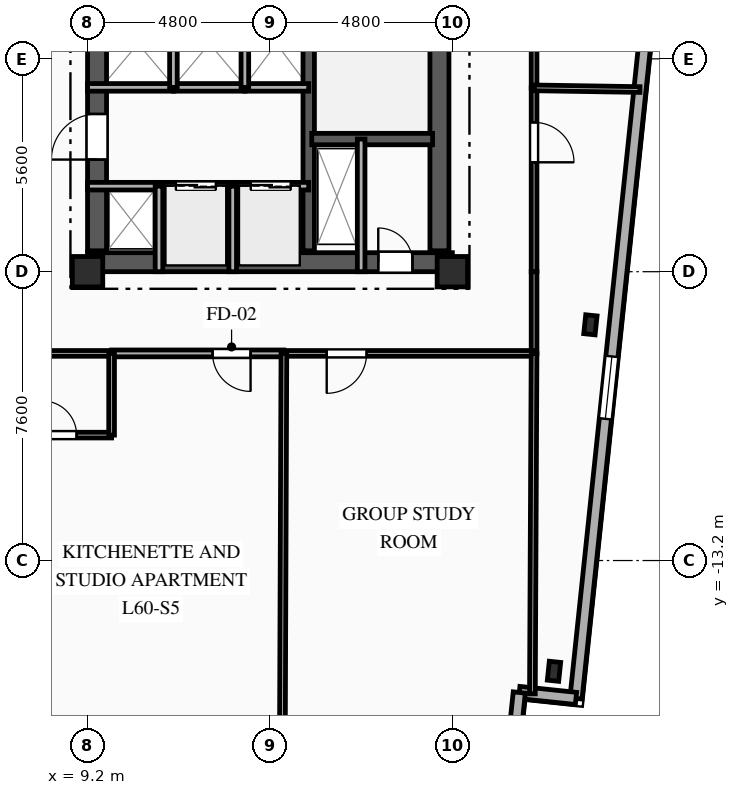
"""IFC4 building model, lengths in metres.
Left out: names, types, materials, properties, quantities, classifications, styles, units other than length and angle.
Written with IfcOpenShell. Run it as: python <this file> out.ifc"""

import sys

from ifc_helpers import new_model, si_unit, direction, frame, frame_2d, origin, origin_2d, place, context, subcontext, project, spatial, rectangle, i_section, extrude, element, fill, save


model = new_model("IFC4")
c1 = context("Model", 3, precision=1e-05, world=origin(), true_north=direction((0.0, 1.0)))
c2 = subcontext(c1, "Body", "Model", "MODEL_VIEW")
j1 = project(units=[si_unit("LENGTHUNIT", "METRE"), si_unit("PLANEANGLEUNIT", "RADIAN")], contexts=[c1])
p1 = place(None, origin())
s1 = spatial("IfcSite", under=j1, at=p1, CompositionType="ELEMENT")
p2 = place(p1, origin())
s2 = spatial("IfcBuilding", under=s1, at=p2, CompositionType="ELEMENT")
p3 = place(p2, frame((0.0, 0.0, 213.15)))
s3 = spatial("IfcBuildingStorey", under=s2, at=p3, CompositionType="ELEMENT", Elevation=213.15)
for number, where, z_axis, x_axis in (
    (1, (9.2, -5.6, 0.0), (0.0, 0.0, 1.0), (1.0, 0.0, 0.0)),
    (2, (18.8, -5.6, 0.0), (0.0, 0.0, 1.0), (1.0, 0.0, 0.0)),
):
    element("IfcColumn", number, at=place(p3, frame(where, z_axis=z_axis, x_axis=x_axis)), inside=s3, PredefinedType="COLUMN", context=c2, shape_type="SweptSolid", body=[
        extrude(rectangle(XDim=0.8, YDim=0.8, at=origin_2d()), origin(), (0.0, 0.0, 1.0), 3.35),
    ])
for number, where, z_axis, x_axis in (
    (3, (21.474, -16.114, 0.0), (0.0, 0.0, 1.0), (0.995, -0.105, 0.0)),
    (4, (22.433, -6.998, 0.0), (0.0, 0.0, 1.0), (0.995, -0.105, 0.0)),
):
    element("IfcColumn", number, at=place(p3, frame(where, z_axis=z_axis, x_axis=x_axis)), inside=s3, PredefinedType="COLUMN", context=c2, shape_type="SweptSolid", body=[
        extrude(i_section(OverallWidth=0.3, OverallDepth=0.5, WebThickness=0.014, FlangeThickness=0.028, FilletRadius=0.027, at=origin_2d()), origin(), (0.0, 0.0, 1.0), 3.35),
    ])
p4 = place(p3, frame((25.063, 11.814, 0.0), z_axis=(0.0, 0.0, 1.0), x_axis=(-0.104523275986, -0.99452244056, 0.0)))
e5 = element("IfcWall", 5, at=p4, inside=s3, PredefinedType="SOLIDWALL", context=c2, shape_type="SweptSolid", body=[
    extrude(rectangle(XDim=28.8, YDim=0.32, at=frame_2d((14.4, 0.0))), origin(), (0.0, 0.0, 1.0), 3.04),
])
p5 = place(p4, frame((5.793, 0.0, 0.85)))
e6 = element("IfcOpeningElement", 6, at=p5, cuts=e5, PredefinedType="OPENING", context=c2, shape_type="SweptSolid", body=[
    extrude(rectangle(XDim=1.65, YDim=1.85, at=frame_2d((0.825, 0.925))), frame((0.0, 0.17, 0.0), z_axis=(0.0, -1.0, 0.0), x_axis=(1.0, 0.0, 0.0)), (0.0, 0.0, 1.0), 0.34),
])
p6 = place(p4, frame((19.752, 0.0, 0.85)))
e7 = element("IfcOpeningElement", 7, at=p6, cuts=e5, PredefinedType="OPENING", context=c2, shape_type="SweptSolid", body=[
    extrude(rectangle(XDim=1.65, YDim=1.85, at=frame_2d((0.825, 0.925))), frame((0.0, 0.17, 0.0), z_axis=(0.0, -1.0, 0.0), x_axis=(1.0, 0.0, 0.0)), (0.0, 0.0, 1.0), 0.34),
])
p7 = place(p3, frame((22.053, -16.828, 0.0), z_axis=(0.0, 0.0, 1.0), x_axis=(-0.994526834051, 0.104481464157, 0.0)))
e8 = element("IfcWall", 8, at=p7, inside=s3, PredefinedType="SOLIDWALL", context=c2, shape_type="SweptSolid", body=[
    extrude(rectangle(XDim=1.5, YDim=0.32, at=frame_2d((0.75, 0.0))), origin(), (0.0, 0.0, 1.0), 3.04),
])
p8 = place(p3, frame((20.561, -16.672, 0.0), z_axis=(0.0, 0.0, 1.0), x_axis=(-0.104498377516, -0.994525057048, 0.0)))
e9 = element("IfcWall", 9, at=p8, inside=s3, PredefinedType="SOLIDWALL", context=c2, shape_type="SweptSolid", body=[
    extrude(rectangle(XDim=1.5, YDim=0.32, at=frame_2d((0.75, 0.0))), origin(), (0.0, 0.0, 1.0), 3.04),
])
p9 = place(p3, frame((18.756, -19.498, 0.0), z_axis=(0.0, 0.0, 1.0), x_axis=(-0.994522060044, 0.104526896475, 0.0)))
e10 = element("IfcWall", 10, at=p9, inside=s3, PredefinedType="SOLIDWALL", context=c2, shape_type="SweptSolid", body=[
    extrude(rectangle(XDim=45.8, YDim=0.32, at=frame_2d((22.9, 0.0))), origin(), (0.0, 0.0, 1.0), 3.04),
])
p10 = place(p9, frame((1.657, 0.0, 0.85)))
e11 = element("IfcOpeningElement", 11, at=p10, cuts=e10, PredefinedType="OPENING", context=c2, shape_type="SweptSolid", body=[
    extrude(rectangle(XDim=1.65, YDim=1.85, at=frame_2d((0.825, 0.925))), frame((0.0, 0.17, 0.0), z_axis=(0.0, -1.0, 0.0), x_axis=(1.0, 0.0, 0.0)), (0.0, 0.0, 1.0), 0.34),
])
p11 = place(p9, frame((6.907, 0.0, 0.85)))
e12 = element("IfcOpeningElement", 12, at=p11, cuts=e10, PredefinedType="OPENING", context=c2, shape_type="SweptSolid", body=[
    extrude(rectangle(XDim=2.2, YDim=1.85, at=frame_2d((1.1, 0.925))), frame((0.0, 0.17, 0.0), z_axis=(0.0, -1.0, 0.0), x_axis=(1.0, 0.0, 0.0)), (0.0, 0.0, 1.0), 0.34),
])
p12 = place(p9, frame((13.953, 0.0, 0.85)))
e13 = element("IfcOpeningElement", 13, at=p12, cuts=e10, PredefinedType="OPENING", context=c2, shape_type="SweptSolid", body=[
    extrude(rectangle(XDim=2.2, YDim=1.85, at=frame_2d((1.1, 0.925))), frame((0.0, 0.17, 0.0), z_axis=(0.0, -1.0, 0.0), x_axis=(1.0, 0.0, 0.0)), (0.0, 0.0, 1.0), 0.34),
])
p13 = place(p9, frame((20.959, 0.0, 0.85)))
e14 = element("IfcOpeningElement", 14, at=p13, cuts=e10, PredefinedType="OPENING", context=c2, shape_type="SweptSolid", body=[
    extrude(rectangle(XDim=2.2, YDim=1.85, at=frame_2d((1.1, 0.925))), frame((0.0, 0.17, 0.0), z_axis=(0.0, -1.0, 0.0), x_axis=(1.0, 0.0, 0.0)), (0.0, 0.0, 1.0), 0.34),
])
p14 = place(p9, frame((27.965, 0.0, 0.85)))
e15 = element("IfcOpeningElement", 15, at=p14, cuts=e10, PredefinedType="OPENING", context=c2, shape_type="SweptSolid", body=[
    extrude(rectangle(XDim=2.2, YDim=1.85, at=frame_2d((1.1, 0.925))), frame((0.0, 0.17, 0.0), z_axis=(0.0, -1.0, 0.0), x_axis=(1.0, 0.0, 0.0)), (0.0, 0.0, 1.0), 0.34),
])
p15 = place(p9, frame((35.487, 0.0, 0.85)))
e16 = element("IfcOpeningElement", 16, at=p15, cuts=e10, PredefinedType="OPENING", context=c2, shape_type="SweptSolid", body=[
    extrude(rectangle(XDim=1.65, YDim=1.85, at=frame_2d((0.825, 0.925))), frame((0.0, 0.17, 0.0), z_axis=(0.0, -1.0, 0.0), x_axis=(1.0, 0.0, 0.0)), (0.0, 0.0, 1.0), 0.34),
])
p16 = place(p9, frame((41.212, 0.0, 0.85)))
e17 = element("IfcOpeningElement", 17, at=p16, cuts=e10, PredefinedType="OPENING", context=c2, shape_type="SweptSolid", body=[
    extrude(rectangle(XDim=1.65, YDim=1.85, at=frame_2d((0.825, 0.925))), frame((0.0, 0.17, 0.0), z_axis=(0.0, -1.0, 0.0), x_axis=(1.0, 0.0, 0.0)), (0.0, 0.0, 1.0), 0.34),
])
p17 = place(p3, frame((9.2, -5.35, 0.0), z_axis=(0.0, 0.0, 1.0), x_axis=(1.0, 0.0, 0.0)))
e18 = element("IfcWall", 18, at=p17, inside=s3, PredefinedType="SHEAR", context=c2, shape_type="SweptSolid", body=[
    extrude(rectangle(XDim=9.6, YDim=0.5, at=frame_2d((4.8, 0.0))), origin(), (0.0, 0.0, 1.0), 3.04),
])
p18 = place(p17, frame((7.65, 0.0, 0.0)))
e19 = element("IfcOpeningElement", 19, at=p18, cuts=e18, PredefinedType="OPENING", context=c2, shape_type="SweptSolid", body=[
    extrude(rectangle(XDim=0.9, YDim=2.1, at=frame_2d((0.45, 1.05))), frame((0.0, 0.26, 0.0), z_axis=(0.0, -1.0, 0.0), x_axis=(1.0, 0.0, 0.0)), (0.0, 0.0, 1.0), 0.52),
])
p19 = place(p3, frame((9.45, -5.05, 0.0), z_axis=(0.0, 0.0, 1.0), x_axis=(0.0, 1.0, 0.0)))
e20 = element("IfcWall", 20, at=p19, inside=s3, PredefinedType="SHEAR", context=c2, shape_type="SweptSolid", body=[
    extrude(rectangle(XDim=10.1, YDim=0.5, at=frame_2d((5.05, 0.0))), origin(), (0.0, 0.0, 1.0), 3.04),
])
p20 = place(p19, frame((7.15, 0.0, 0.0)))
e21 = element("IfcOpeningElement", 21, at=p20, cuts=e20, PredefinedType="OPENING", context=c2, shape_type="SweptSolid", body=[
    extrude(rectangle(XDim=0.9, YDim=2.1, at=frame_2d((0.45, 1.05))), frame((0.0, 0.26, 0.0), z_axis=(0.0, -1.0, 0.0), x_axis=(1.0, 0.0, 0.0)), (0.0, 0.0, 1.0), 0.52),
])
p21 = place(p19, frame((2.4, 0.0, 0.0)))
e22 = element("IfcOpeningElement", 22, at=p21, cuts=e20, PredefinedType="OPENING", context=c2, shape_type="SweptSolid", body=[
    extrude(rectangle(XDim=1.2, YDim=2.15, at=frame_2d((0.6, 1.075))), frame((0.0, 0.26, 0.0), z_axis=(0.0, -1.0, 0.0), x_axis=(1.0, 0.0, 0.0)), (0.0, 0.0, 1.0), 0.52),
])
p22 = place(p3, frame((18.46, -5.05, 0.0), z_axis=(0.0, 0.0, 1.0), x_axis=(0.0, 1.0, 0.0)))
e23 = element("IfcWall", 23, at=p22, inside=s3, PredefinedType="SHEAR", context=c2, shape_type="SweptSolid", body=[
    extrude(rectangle(XDim=10.1, YDim=0.5, at=frame_2d((5.05, 0.0))), origin(), (0.0, 0.0, 1.0), 3.04),
])
p23 = place(p3, frame((15.02, -5.05, 0.0), z_axis=(0.0, 0.0, 1.0), x_axis=(0.0, 1.0, 0.0)))
e24 = element("IfcWall", 24, at=p23, inside=s3, PredefinedType="SHEAR", context=c2, shape_type="SweptSolid", body=[
    extrude(rectangle(XDim=10.1, YDim=0.3, at=frame_2d((5.05, 0.0))), origin(), (0.0, 0.0, 1.0), 3.04),
])
p24 = place(p3, frame((15.1, -2.11, 0.0), z_axis=(0.0, 0.0, 1.0), x_axis=(1.0, 0.0, 0.0)))
e25 = element("IfcWall", 25, at=p24, inside=s3, PredefinedType="SHEAR", context=c2, shape_type="SweptSolid", body=[
    extrude(rectangle(XDim=3.18, YDim=0.3, at=frame_2d((1.59, 0.0))), origin(), (0.0, 0.0, 1.0), 3.04),
])
p25 = place(p3, frame((16.4, -2.11, 0.0), z_axis=(0.0, 0.0, 1.0), x_axis=(0.0, -1.0, 0.0)))
e26 = element("IfcWall", 26, at=p25, inside=s3, PredefinedType="PARTITIONING", context=c2, shape_type="SweptSolid", body=[
    extrude(rectangle(XDim=3.49, YDim=0.2, at=frame_2d((1.745, 0.0))), origin(), (0.0, 0.0, 1.0), 3.04),
])
p26 = place(p3, frame((9.2, -3.35, 0.0), z_axis=(0.0, 0.0, 1.0), x_axis=(1.0, 0.0, 0.0)))
e27 = element("IfcWall", 27, at=p26, inside=s3, PredefinedType="PARTITIONING", context=c2, shape_type="SweptSolid", body=[
    extrude(rectangle(XDim=1.88, YDim=0.2, at=frame_2d((0.94, 0.0))), origin(), (0.0, 0.0, 1.0), 2.755),
])
p27 = place(p3, frame((11.08, -3.35, 0.0), z_axis=(0.0, 0.0, 1.0), x_axis=(1.0, 0.0, 0.0)))
e28 = element("IfcWall", 28, at=p27, inside=s3, PredefinedType="PARTITIONING", context=c2, shape_type="SweptSolid", body=[
    extrude(rectangle(XDim=1.94, YDim=0.2, at=frame_2d((0.97, 0.0))), origin(), (0.0, 0.0, 1.0), 3.04),
])
p28 = place(p27, frame((0.445, 0.0, 0.0)))
e29 = element("IfcOpeningElement", 29, at=p28, cuts=e28, PredefinedType="OPENING", context=c2, shape_type="SweptSolid", body=[
    extrude(rectangle(XDim=1.05, YDim=2.1, at=frame_2d((0.525, 1.05))), frame((0.0, 0.11, 0.0), z_axis=(0.0, -1.0, 0.0), x_axis=(1.0, 0.0, 0.0)), (0.0, 0.0, 1.0), 0.22),
])
p29 = place(p3, frame((13.02, -3.35, 0.0), z_axis=(0.0, 0.0, 1.0), x_axis=(1.0, 0.0, 0.0)))
e30 = element("IfcWall", 30, at=p29, inside=s3, PredefinedType="PARTITIONING", context=c2, shape_type="SweptSolid", body=[
    extrude(rectangle(XDim=2.0, YDim=0.2, at=frame_2d((1.0, 0.0))), origin(), (0.0, 0.0, 1.0), 3.04),
])
p30 = place(p29, frame((0.475, 0.0, 0.0)))
e31 = element("IfcOpeningElement", 31, at=p30, cuts=e30, PredefinedType="OPENING", context=c2, shape_type="SweptSolid", body=[
    extrude(rectangle(XDim=1.05, YDim=2.1, at=frame_2d((0.525, 1.05))), frame((0.0, 0.11, 0.0), z_axis=(0.0, -1.0, 0.0), x_axis=(1.0, 0.0, 0.0)), (0.0, 0.0, 1.0), 0.22),
])
p31 = place(p3, frame((11.46, -0.75, 0.0), z_axis=(0.0, 0.0, 1.0), x_axis=(-1.0, 0.0, 0.0)))
e32 = element("IfcWall", 32, at=p31, inside=s3, PredefinedType="PARTITIONING", context=c2, shape_type="SweptSolid", body=[
    extrude(rectangle(XDim=2.26, YDim=0.2, at=frame_2d((1.13, 0.0))), origin(), (0.0, 0.0, 1.0), 3.04),
])
p32 = place(p3, frame((13.34, -0.75, 0.0), z_axis=(0.0, 0.0, 1.0), x_axis=(-1.0, 0.0, 0.0)))
e33 = element("IfcWall", 33, at=p32, inside=s3, PredefinedType="PARTITIONING", context=c2, shape_type="SweptSolid", body=[
    extrude(rectangle(XDim=1.88, YDim=0.2, at=frame_2d((0.94, 0.0))), origin(), (0.0, 0.0, 1.0), 3.04),
])
p33 = place(p3, frame((15.02, -0.75, 0.0), z_axis=(0.0, 0.0, 1.0), x_axis=(-1.0, 0.0, 0.0)))
e34 = element("IfcWall", 34, at=p33, inside=s3, PredefinedType="PARTITIONING", context=c2, shape_type="SweptSolid", body=[
    extrude(rectangle(XDim=1.68, YDim=0.2, at=frame_2d((0.84, 0.0))), origin(), (0.0, 0.0, 1.0), 3.04),
])
for number, where, z_axis, x_axis in (
    (35, (11.08, -5.6, 0.0), (0.0, 0.0, 1.0), (0.0, 1.0, 0.0)),
    (36, (13.02, -5.6, 0.0), (0.0, 0.0, 1.0), (0.0, 1.0, 0.0)),
):
    element("IfcWall", number, at=place(p3, frame(where, z_axis=z_axis, x_axis=x_axis)), inside=s3, PredefinedType="PARTITIONING", context=c2, shape_type="SweptSolid", body=[
        extrude(rectangle(XDim=2.25, YDim=0.2, at=frame_2d((1.125, 0.0))), origin(), (0.0, 0.0, 1.0), 3.04),
    ])
for number, where, z_axis, x_axis in (
    (37, (11.46, -0.75, 0.0), (0.0, 0.0, 1.0), (0.0, 1.0, 0.0)),
    (38, (13.34, -0.75, 0.0), (0.0, 0.0, 1.0), (0.0, 1.0, 0.0)),
):
    element("IfcWall", number, at=place(p3, frame(where, z_axis=z_axis, x_axis=x_axis)), inside=s3, PredefinedType="PARTITIONING", context=c2, shape_type="SweptSolid", body=[
        extrude(rectangle(XDim=2.3, YDim=0.2, at=frame_2d((1.15, 0.0))), origin(), (0.0, 0.0, 1.0), 3.04),
    ])
p34 = place(p3, frame((20.95, -5.6, 0.0), z_axis=(0.0, 0.0, 1.0), x_axis=(0.0, -1.0, 0.0)))
e39 = element("IfcWall", 39, at=p34, inside=s3, PredefinedType="PARTITIONING", context=c2, shape_type="SweptSolid", body=[
    extrude(rectangle(XDim=2.15, YDim=0.15, at=frame_2d((1.075, 0.0))), origin(), (0.0, 0.0, 1.0), 3.04),
])
p35 = place(p3, frame((14.367, -7.75, 0.0), z_axis=(0.0, 0.0, 1.0), x_axis=(-1.0, 0.0, 0.0)))
e40 = element("IfcWall", 40, at=p35, inside=s3, PredefinedType="PARTITIONING", context=c2, shape_type="SweptSolid", body=[
    extrude(rectangle(XDim=4.534, YDim=0.18, at=frame_2d((2.267, 0.0))), origin(), (0.0, 0.0, 1.0), 3.04),
])
p36 = place(p35, frame((0.877, 0.0, 0.0)))
e41 = element("IfcOpeningElement", 41, at=p36, cuts=e40, PredefinedType="OPENING", context=c2, shape_type="SweptSolid", body=[
    extrude(rectangle(XDim=1.0, YDim=2.15, at=frame_2d((0.5, 1.075))), frame((0.0, 0.1, 0.0), z_axis=(0.0, -1.0, 0.0), x_axis=(1.0, 0.0, 0.0)), (0.0, 0.0, 1.0), 0.2),
])
p37 = place(p3, frame((9.833, -7.75, 0.0), z_axis=(0.0, 0.0, 1.0), x_axis=(-1.0, 0.0, 0.0)))
e42 = element("IfcWall", 42, at=p37, inside=s3, PredefinedType="PLUMBINGWALL", context=c2, shape_type="SweptSolid", body=[
    extrude(rectangle(XDim=2.45, YDim=0.15, at=frame_2d((1.225, 0.0))), origin(), (0.0, 0.0, 1.0), 3.04),
])
p38 = place(p3, frame((20.95, -7.75, 0.0), z_axis=(0.0, 0.0, 1.0), x_axis=(-1.0, 0.0, 0.0)))
e43 = element("IfcWall", 43, at=p38, inside=s3, PredefinedType="PARTITIONING", context=c2, shape_type="SweptSolid", body=[
    extrude(rectangle(XDim=6.583, YDim=0.15, at=frame_2d((3.292, 0.0))), origin(), (0.0, 0.0, 1.0), 3.04),
])
p39 = place(p38, frame((4.406, 0.0, 0.0)))
e44 = element("IfcOpeningElement", 44, at=p39, cuts=e43, PredefinedType="OPENING", context=c2, shape_type="SweptSolid", body=[
    extrude(rectangle(XDim=1.05, YDim=2.15, at=frame_2d((0.525, 1.075))), frame((0.0, 0.085, 0.0), z_axis=(0.0, -1.0, 0.0), x_axis=(1.0, 0.0, 0.0)), (0.0, 0.0, 1.0), 0.17),
])
p40 = place(p3, frame((20.95, -0.763, 0.0), z_axis=(0.0, 0.0, 1.0), x_axis=(0.0, -1.0, 0.0)))
e45 = element("IfcWall", 45, at=p40, inside=s3, PredefinedType="PARTITIONING", context=c2, shape_type="SweptSolid", body=[
    extrude(rectangle(XDim=4.837, YDim=0.15, at=frame_2d((2.418, 0.0))), origin(), (0.0, 0.0, 1.0), 2.695),
])
p41 = place(p40, frame((0.908, 0.0, 0.0)))
e46 = element("IfcOpeningElement", 46, at=p41, cuts=e45, PredefinedType="OPENING", context=c2, shape_type="SweptSolid", body=[
    extrude(rectangle(XDim=1.05, YDim=2.15, at=frame_2d((0.525, 1.075))), frame((0.0, 0.085, 0.0), z_axis=(0.0, -1.0, 0.0), x_axis=(1.0, 0.0, 0.0)), (0.0, 0.0, 1.0), 0.17),
])
p42 = place(p3, frame((20.95, 8.5, 0.0), z_axis=(0.0, 0.0, 1.0), x_axis=(0.0, -1.0, 0.0)))
e47 = element("IfcWall", 47, at=p42, inside=s3, PredefinedType="PARTITIONING", context=c2, shape_type="SweptSolid", body=[
    extrude(rectangle(XDim=9.263, YDim=0.15, at=frame_2d((4.632, 0.0))), origin(), (0.0, 0.0, 1.0), 2.695),
])
p43 = place(p42, frame((6.751, 0.0, 0.0)))
e48 = element("IfcOpeningElement", 48, at=p43, cuts=e47, PredefinedType="OPENING", context=c2, shape_type="SweptSolid", body=[
    extrude(rectangle(XDim=1.05, YDim=2.15, at=frame_2d((0.525, 1.075))), frame((0.0, 0.085, 0.0), z_axis=(0.0, -1.0, 0.0), x_axis=(1.0, 0.0, 0.0)), (0.0, 0.0, 1.0), 0.17),
])
p44 = place(p3, frame((20.95, -0.763, 0.0), z_axis=(0.0, 0.0, 1.0), x_axis=(0.999875696831, -0.015766765259, 0.0)))
e49 = element("IfcWall", 49, at=p44, inside=s3, PredefinedType="PARTITIONING", context=c2, shape_type="SweptSolid", body=[
    extrude(rectangle(XDim=2.787, YDim=0.15, at=frame_2d((1.394, 0.0))), origin(), (0.0, 0.0, 1.0), 3.04),
])
p45 = place(p3, frame((20.906, -16.708, 0.0), z_axis=(0.0, 0.0, 1.0), x_axis=(0.004905642486, 0.999987967264, 0.0)))
e50 = element("IfcWall", 50, at=p45, inside=s3, PredefinedType="PARTITIONING", context=c2, shape_type="SweptSolid", body=[
    extrude(rectangle(XDim=8.958, YDim=0.15, at=frame_2d((4.479, 0.0))), origin(), (0.0, 0.0, 1.0), 2.665),
])
p46 = place(p3, frame((7.383, -9.9, 0.0), z_axis=(0.0, 0.0, 1.0), x_axis=(1.0, 0.0, 0.0)))
e51 = element("IfcWall", 51, at=p46, inside=s3, PredefinedType="PLUMBINGWALL", context=c2, shape_type="SweptSolid", body=[
    extrude(rectangle(XDim=2.45, YDim=0.15, at=frame_2d((1.225, 0.0))), origin(), (0.0, 0.0, 1.0), 3.04),
])
p47 = place(p46, frame((0.629, 0.0, 0.0)))
e52 = element("IfcOpeningElement", 52, at=p47, cuts=e51, PredefinedType="OPENING", context=c2, shape_type="SweptSolid", body=[
    extrude(rectangle(XDim=0.9, YDim=2.1, at=frame_2d((0.45, 1.05))), frame((0.0, 0.085, 0.0), z_axis=(0.0, -1.0, 0.0), x_axis=(1.0, 0.0, 0.0)), (0.0, 0.0, 1.0), 0.17),
])
p48 = place(p3, frame((9.833, -9.9, 0.0), z_axis=(0.0, 0.0, 1.0), x_axis=(0.0, 1.0, 0.0)))
e53 = element("IfcWall", 53, at=p48, inside=s3, PredefinedType="PLUMBINGWALL", context=c2, shape_type="SweptSolid", body=[
    extrude(rectangle(XDim=2.15, YDim=0.15, at=frame_2d((1.075, 0.0))), origin(), (0.0, 0.0, 1.0), 3.04),
])
p49 = place(p3, frame((14.367, -7.75, 0.0), z_axis=(0.0, 0.0, 1.0), x_axis=(-0.003894978353, -0.999992414543, 0.0)))
e54 = element("IfcWall", 54, at=p49, inside=s3, PredefinedType="PARTITIONING", context=c2, shape_type="SweptSolid", body=[
    extrude(rectangle(XDim=11.282, YDim=0.15, at=frame_2d((5.641, 0.0))), origin(), (0.0, 0.0, 1.0), 3.04),
])
p50 = place(p6, origin())
e55 = element("IfcWindow", 55, at=p50, inside=s3, PartitioningType="SINGLE_PANEL", PredefinedType="WINDOW", context=c2, shape_type="SweptSolid", body=[
    extrude(rectangle(XDim=1.65, YDim=1.85, at=frame_2d((0.825, 0.925))), frame((0.0, 0.03, 0.0), z_axis=(0.0, -1.0, 0.0), x_axis=(1.0, 0.0, 0.0)), (0.0, 0.0, 1.0), 0.06),
])
fill(e7, e55)
p51 = place(p18, origin())
e56 = element("IfcDoor", 56, at=p51, inside=s3, OperationType="SINGLE_SWING_LEFT", PredefinedType="DOOR", context=c2, shape_type="SweptSolid", body=[
    extrude(rectangle(XDim=0.9, YDim=2.1, at=frame_2d((0.45, 1.05))), frame((0.0, 0.025, 0.0), z_axis=(0.0, -1.0, 0.0), x_axis=(1.0, 0.0, 0.0)), (0.0, 0.0, 1.0), 0.05),
])
fill(e19, e56)
p52 = place(p28, origin())
e57 = element("IfcDoor", 57, at=p52, inside=s3, OperationType="DOUBLE_DOOR_SLIDING", PredefinedType="DOOR", context=c2, shape_type="SweptSolid", body=[
    extrude(rectangle(XDim=1.05, YDim=2.1, at=frame_2d((0.525, 1.05))), frame((0.0, 0.025, 0.0), z_axis=(0.0, -1.0, 0.0), x_axis=(1.0, 0.0, 0.0)), (0.0, 0.0, 1.0), 0.05),
])
fill(e29, e57)
p53 = place(p30, origin())
e58 = element("IfcDoor", 58, at=p53, inside=s3, OperationType="DOUBLE_DOOR_SLIDING", PredefinedType="DOOR", context=c2, shape_type="SweptSolid", body=[
    extrude(rectangle(XDim=1.05, YDim=2.1, at=frame_2d((0.525, 1.05))), frame((0.0, 0.025, 0.0), z_axis=(0.0, -1.0, 0.0), x_axis=(1.0, 0.0, 0.0)), (0.0, 0.0, 1.0), 0.05),
])
fill(e31, e58)
p54 = place(p21, origin())
e59 = element("IfcDoor", 59, at=p54, inside=s3, OperationType="SINGLE_SWING_LEFT", PredefinedType="DOOR", context=c2, shape_type="SweptSolid", body=[
    extrude(rectangle(XDim=1.2, YDim=2.15, at=frame_2d((0.6, 1.075))), frame((0.0, 0.025, 0.0), z_axis=(0.0, -1.0, 0.0), x_axis=(1.0, 0.0, 0.0)), (0.0, 0.0, 1.0), 0.05),
])
fill(e22, e59)
p55 = place(p36, origin())
e60 = element("IfcDoor", 60, at=p55, inside=s3, OperationType="SINGLE_SWING_LEFT", PredefinedType="DOOR", context=c2, shape_type="SweptSolid", body=[
    extrude(rectangle(XDim=1.0, YDim=2.15, at=frame_2d((0.5, 1.075))), frame((0.0, 0.025, 0.0), z_axis=(0.0, -1.0, 0.0), x_axis=(1.0, 0.0, 0.0)), (0.0, 0.0, 1.0), 0.05),
])
fill(e41, e60)
p56 = place(p39, origin())
e61 = element("IfcDoor", 61, at=p56, inside=s3, OperationType="SINGLE_SWING_RIGHT", PredefinedType="DOOR", context=c2, shape_type="SweptSolid", body=[
    extrude(rectangle(XDim=1.05, YDim=2.15, at=frame_2d((0.525, 1.075))), frame((0.0, 0.025, 0.0), z_axis=(0.0, -1.0, 0.0), x_axis=(1.0, 0.0, 0.0)), (0.0, 0.0, 1.0), 0.05),
])
fill(e44, e61)
p57 = place(p41, origin())
e62 = element("IfcDoor", 62, at=p57, inside=s3, OperationType="SINGLE_SWING_RIGHT", PredefinedType="DOOR", context=c2, shape_type="SweptSolid", body=[
    extrude(rectangle(XDim=1.05, YDim=2.15, at=frame_2d((0.525, 1.075))), frame((0.0, 0.025, 0.0), z_axis=(0.0, -1.0, 0.0), x_axis=(1.0, 0.0, 0.0)), (0.0, 0.0, 1.0), 0.05),
])
fill(e46, e62)
p58 = place(p47, origin())
e63 = element("IfcDoor", 63, at=p58, inside=s3, OperationType="SINGLE_SWING_LEFT", PredefinedType="DOOR", context=c2, shape_type="SweptSolid", body=[
    extrude(rectangle(XDim=0.9, YDim=2.1, at=frame_2d((0.45, 1.05))), frame((0.0, 0.025, 0.0), z_axis=(0.0, -1.0, 0.0), x_axis=(1.0, 0.0, 0.0)), (0.0, 0.0, 1.0), 0.05),
])
fill(e52, e63)
save(model, sys.argv[1])
